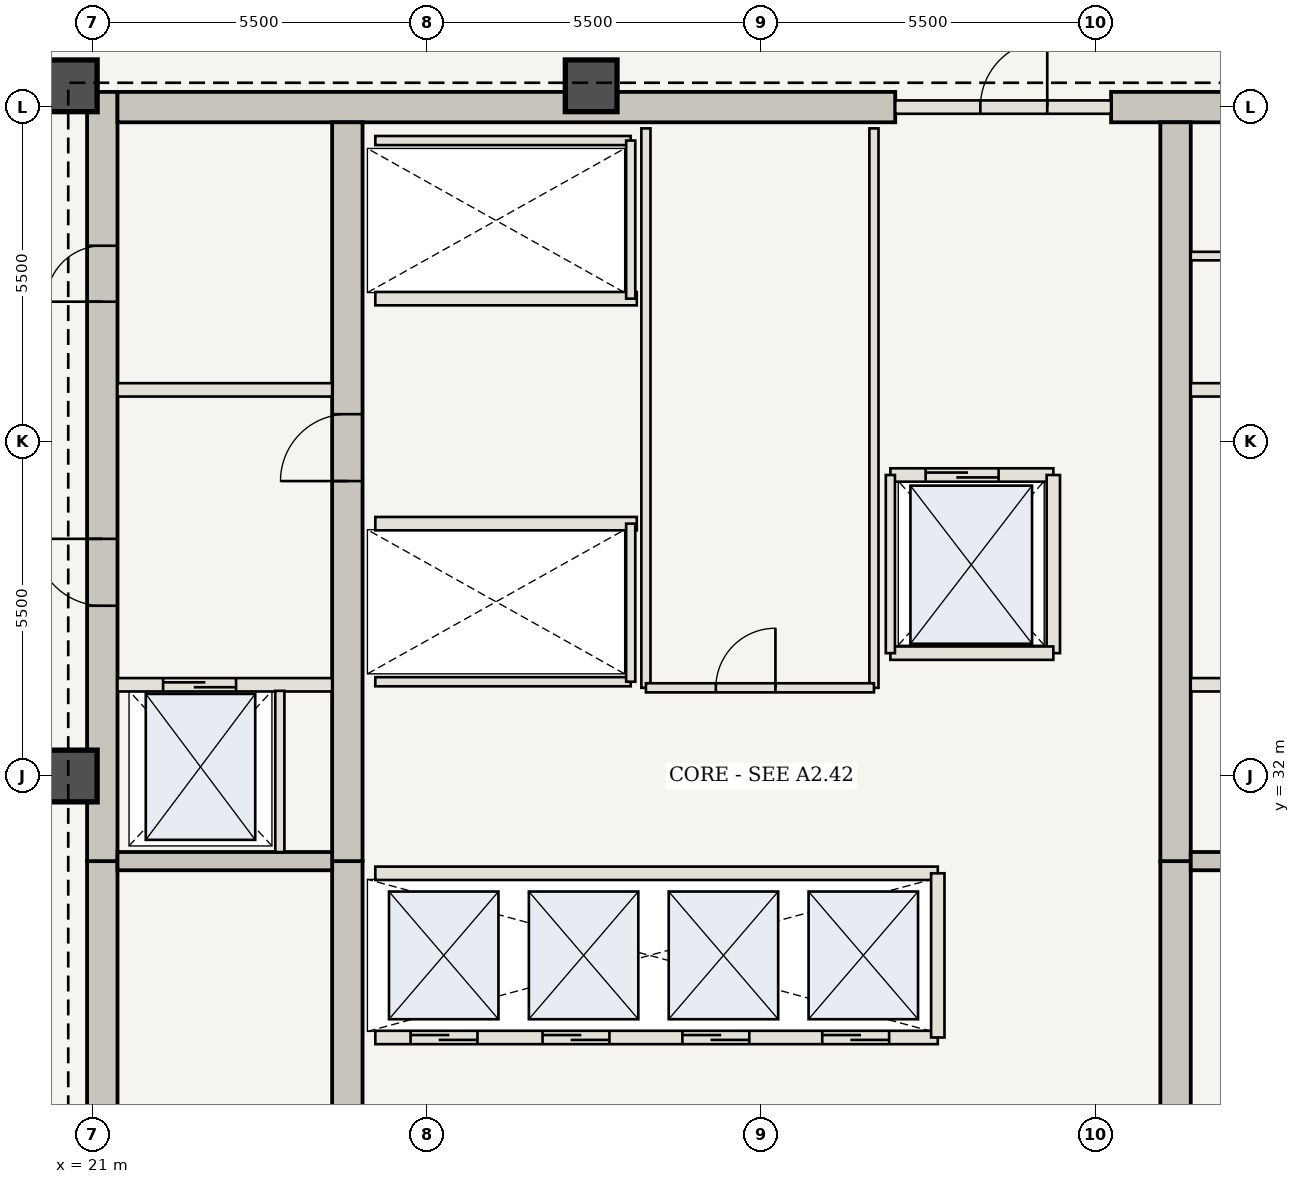
"""IFC4 building model, lengths in metres.
Left out: names, types, materials, properties, quantities, classifications, styles, units other than length and angle.
Written with IfcOpenShell. Run it as: python <this file> out.ifc"""

import sys

from ifc_helpers import new_model, si_unit, direction, frame, frame_2d, origin, origin_2d, place, context, subcontext, project, spatial, rectangle, extrude, element, fill, save


model = new_model("IFC4")
c1 = context("Model", 3, precision=1e-05, world=origin(), true_north=direction((0.0, 1.0)))
c2 = subcontext(c1, "Body", "Model", "MODEL_VIEW")
j1 = project(units=[si_unit("LENGTHUNIT", "METRE"), si_unit("PLANEANGLEUNIT", "RADIAN")], contexts=[c1])
p1 = place(None, origin())
s1 = spatial("IfcSite", under=j1, at=p1, CompositionType="ELEMENT")
p2 = place(p1, origin())
s2 = spatial("IfcBuilding", under=s1, at=p2, CompositionType="ELEMENT")
p3 = place(p2, frame((0.0, 0.0, 186.9)))
s3 = spatial("IfcBuildingStorey", under=s2, at=p3, CompositionType="ELEMENT", Elevation=186.9)
p4 = place(p3, frame((21.16, 20.7, 0.0), z_axis=(0.0, 0.0, 1.0), x_axis=(0.0, 1.0, 0.0)))
e1 = element("IfcWall", 1, at=p4, inside=s3, PredefinedType="SHEAR", context=c2, shape_type="SweptSolid", body=[
    extrude(rectangle(XDim=9.9, YDim=0.5, at=frame_2d((4.95, 0.0))), origin(), (0.0, 0.0, 1.0), 3.85),
])
p5 = place(p4, frame((1.05, 0.0, 0.0)))
e2 = element("IfcOpeningElement", 2, at=p5, cuts=e1, PredefinedType="OPENING", context=c2, shape_type="SweptSolid", body=[
    extrude(rectangle(XDim=1.15, YDim=2.15, at=frame_2d((0.575, 1.075))), frame((0.0, 0.26, 0.0), z_axis=(0.0, -1.0, 0.0), x_axis=(1.0, 0.0, 0.0)), (0.0, 0.0, 1.0), 0.52),
])
p6 = place(p3, frame((21.16, 30.6, 0.0), z_axis=(0.0, 0.0, 1.0), x_axis=(0.0, 1.0, 0.0)))
e3 = element("IfcWall", 3, at=p6, inside=s3, PredefinedType="SHEAR", context=c2, shape_type="SweptSolid", body=[
    extrude(rectangle(XDim=12.65, YDim=0.5, at=frame_2d((6.325, 0.0))), origin(), (0.0, 0.0, 1.0), 3.85),
])
p7 = place(p6, frame((4.2, 0.0, 0.0)))
e4 = element("IfcOpeningElement", 4, at=p7, cuts=e3, PredefinedType="OPENING", context=c2, shape_type="SweptSolid", body=[
    extrude(rectangle(XDim=1.1, YDim=2.15, at=frame_2d((0.55, 1.075))), frame((0.0, 0.26, 0.0), z_axis=(0.0, -1.0, 0.0), x_axis=(1.0, 0.0, 0.0)), (0.0, 0.0, 1.0), 0.52),
])
p8 = place(p6, frame((9.2, 0.0, 0.0)))
e5 = element("IfcOpeningElement", 5, at=p8, cuts=e3, PredefinedType="OPENING", context=c2, shape_type="SweptSolid", body=[
    extrude(rectangle(XDim=0.92, YDim=2.1, at=frame_2d((0.46, 1.05))), frame((0.0, 0.26, 0.0), z_axis=(0.0, -1.0, 0.0), x_axis=(1.0, 0.0, 0.0)), (0.0, 0.0, 1.0), 0.52),
])
p9 = place(p3, frame((21.41, 43.0, 0.0), z_axis=(0.0, 0.0, 1.0), x_axis=(1.0, 0.0, 0.0)))
e6 = element("IfcWall", 6, at=p9, inside=s3, PredefinedType="SHEAR", context=c2, shape_type="SweptSolid", body=[
    extrude(rectangle(XDim=12.79, YDim=0.5, at=frame_2d((6.395, 0.0))), origin(), (0.0, 0.0, 1.0), 3.85),
])
p10 = place(p3, frame((37.75, 43.0, 0.0), z_axis=(0.0, 0.0, 1.0), x_axis=(1.0, 0.0, 0.0)))
e7 = element("IfcWall", 7, at=p10, inside=s3, PredefinedType="SHEAR", context=c2, shape_type="SweptSolid", body=[
    extrude(rectangle(XDim=4.84, YDim=0.5, at=frame_2d((2.42, 0.0))), origin(), (0.0, 0.0, 1.0), 3.85),
])
p11 = place(p3, frame((25.19, 21.2, 0.0), z_axis=(0.0, 0.0, 1.0), x_axis=(0.0, 1.0, 0.0)))
e8 = element("IfcWall", 8, at=p11, inside=s3, PredefinedType="SHEAR", context=c2, shape_type="SweptSolid", body=[
    extrude(rectangle(XDim=9.4, YDim=0.5, at=frame_2d((4.7, 0.0))), origin(), (0.0, 0.0, 1.0), 3.85),
])
p12 = place(p3, frame((25.19, 30.6, 0.0), z_axis=(0.0, 0.0, 1.0), x_axis=(0.0, 1.0, 0.0)))
e9 = element("IfcWall", 9, at=p12, inside=s3, PredefinedType="SHEAR", context=c2, shape_type="SweptSolid", body=[
    extrude(rectangle(XDim=12.15, YDim=0.5, at=frame_2d((6.075, 0.0))), origin(), (0.0, 0.0, 1.0), 3.85),
])
p13 = place(p12, frame((6.25, 0.0, 0.0)))
e10 = element("IfcOpeningElement", 10, at=p13, cuts=e9, PredefinedType="OPENING", context=c2, shape_type="SweptSolid", body=[
    extrude(rectangle(XDim=1.1, YDim=2.15, at=frame_2d((0.55, 1.075))), frame((0.0, 0.26, 0.0), z_axis=(0.0, -1.0, 0.0), x_axis=(1.0, 0.0, 0.0)), (0.0, 0.0, 1.0), 0.52),
])
p14 = place(p3, frame((38.81, 21.2, 0.0), z_axis=(0.0, 0.0, 1.0), x_axis=(0.0, 1.0, 0.0)))
e11 = element("IfcWall", 11, at=p14, inside=s3, PredefinedType="SHEAR", context=c2, shape_type="SweptSolid", body=[
    extrude(rectangle(XDim=9.4, YDim=0.5, at=frame_2d((4.7, 0.0))), origin(), (0.0, 0.0, 1.0), 3.85),
])
p15 = place(p3, frame((38.81, 30.6, 0.0), z_axis=(0.0, 0.0, 1.0), x_axis=(0.0, 1.0, 0.0)))
e12 = element("IfcWall", 12, at=p15, inside=s3, PredefinedType="SHEAR", context=c2, shape_type="SweptSolid", body=[
    extrude(rectangle(XDim=12.15, YDim=0.5, at=frame_2d((6.075, 0.0))), origin(), (0.0, 0.0, 1.0), 3.85),
])
for number, where, z_axis, x_axis in (
    (13, (29.2, 43.35, 0.0), (0.0, 0.0, 1.0), (1.0, 0.0, 0.0)),
    (14, (20.65, 43.35, 0.0), (0.0, 0.0, 1.0), (1.0, 0.0, 0.0)),
    (15, (20.65, 32.0, 0.0), (0.0, 0.0, 1.0), (1.0, 0.0, 0.0)),
):
    element("IfcColumn", number, at=place(p3, frame(where, z_axis=z_axis, x_axis=x_axis)), inside=s3, PredefinedType="COLUMN", context=c2, shape_type="SweptSolid", body=[
        extrude(rectangle(XDim=0.85, YDim=0.85, at=origin_2d()), origin(), (0.0, 0.0, 1.0), 3.85),
    ])
for number, where, z_axis, x_axis in (
    (16, (21.41, 30.6, 0.0), (0.0, 0.0, 1.0), (1.0, 0.0, 0.0)),
    (17, (39.06, 30.6, 0.0), (0.0, 0.0, 1.0), (1.0, 0.0, 0.0)),
):
    element("IfcWall", number, at=place(p3, frame(where, z_axis=z_axis, x_axis=x_axis)), inside=s3, PredefinedType="SHEAR", context=c2, shape_type="SweptSolid", body=[
        extrude(rectangle(XDim=3.53, YDim=0.3, at=frame_2d((1.765, 0.0))), origin(), (0.0, 0.0, 1.0), 3.43),
    ])
p16 = place(p3, frame((21.41, 33.5, 0.0), z_axis=(0.0, 0.0, 1.0), x_axis=(1.0, 0.0, 0.0)))
e18 = element("IfcWall", 18, at=p16, inside=s3, PredefinedType="STANDARD", context=c2, shape_type="SweptSolid", body=[
    extrude(rectangle(XDim=3.53, YDim=0.22, at=frame_2d((1.765, 0.0))), origin(), (0.0, 0.0, 1.0), 3.43),
])
p17 = place(p16, frame((0.75, 0.0, 0.0)))
e19 = element("IfcOpeningElement", 19, at=p17, cuts=e18, PredefinedType="OPENING", context=c2, shape_type="SweptSolid", body=[
    extrude(rectangle(XDim=1.2, YDim=2.2, at=frame_2d((0.6, 1.1))), frame((0.0, 0.12, 0.0), z_axis=(0.0, -1.0, 0.0), x_axis=(1.0, 0.0, 0.0)), (0.0, 0.0, 1.0), 0.24),
])
p18 = place(p3, frame((24.08, 30.75, 0.0), z_axis=(0.0, 0.0, 1.0), x_axis=(0.0, 1.0, 0.0)))
e20 = element("IfcWall", 20, at=p18, inside=s3, PredefinedType="STANDARD", context=c2, shape_type="SweptSolid", body=[
    extrude(rectangle(XDim=2.65, YDim=0.15, at=frame_2d((1.325, 0.0))), origin(), (0.0, 0.0, 1.0), 3.43),
])
p19 = place(p3, frame((39.06, 33.5, 0.0), z_axis=(0.0, 0.0, 1.0), x_axis=(1.0, 0.0, 0.0)))
e21 = element("IfcWall", 21, at=p19, inside=s3, PredefinedType="STANDARD", context=c2, shape_type="SweptSolid", body=[
    extrude(rectangle(XDim=3.53, YDim=0.22, at=frame_2d((1.765, 0.0))), origin(), (0.0, 0.0, 1.0), 3.43),
])
p20 = place(p19, frame((1.55, 0.0, 0.0)))
e22 = element("IfcOpeningElement", 22, at=p20, cuts=e21, PredefinedType="OPENING", context=c2, shape_type="SweptSolid", body=[
    extrude(rectangle(XDim=1.2, YDim=2.2, at=frame_2d((0.6, 1.1))), frame((0.0, 0.12, 0.0), z_axis=(0.0, -1.0, 0.0), x_axis=(1.0, 0.0, 0.0)), (0.0, 0.0, 1.0), 0.24),
])
for number, where, z_axis, x_axis in (
    (23, (21.41, 38.35, 0.0), (0.0, 0.0, 1.0), (1.0, 0.0, 0.0)),
    (24, (39.06, 38.35, 0.0), (0.0, 0.0, 1.0), (1.0, 0.0, 0.0)),
):
    element("IfcWall", number, at=place(p3, frame(where, z_axis=z_axis, x_axis=x_axis)), inside=s3, PredefinedType="STANDARD", context=c2, shape_type="SweptSolid", body=[
        extrude(rectangle(XDim=3.53, YDim=0.22, at=frame_2d((1.765, 0.0))), origin(), (0.0, 0.0, 1.0), 3.43),
    ])
p21 = place(p3, frame((39.06, 40.55, 0.0), z_axis=(0.0, 0.0, 1.0), x_axis=(1.0, 0.0, 0.0)))
e25 = element("IfcWall", 25, at=p21, inside=s3, PredefinedType="STANDARD", context=c2, shape_type="SweptSolid", body=[
    extrude(rectangle(XDim=3.53, YDim=0.14, at=frame_2d((1.765, 0.0))), origin(), (0.0, 0.0, 1.0), 3.43),
])
p22 = place(p3, frame((25.65, 27.7, 0.0), z_axis=(0.0, 0.0, 1.0), x_axis=(1.0, 0.0, 0.0)))
e26 = element("IfcWall", 26, at=p22, inside=s3, PredefinedType="STANDARD", context=c2, shape_type="SweptSolid", body=[
    extrude(rectangle(XDim=9.25, YDim=0.22, at=frame_2d((4.625, 0.0))), origin(), (0.0, 0.0, 1.0), 3.43),
])
p23 = place(p22, frame((0.58, 0.0, 0.0)))
e27 = element("IfcOpeningElement", 27, at=p23, cuts=e26, PredefinedType="OPENING", context=c2, shape_type="SweptSolid", body=[
    extrude(rectangle(XDim=1.1, YDim=2.15, at=frame_2d((0.55, 1.075))), frame((0.0, 0.12, 0.0), z_axis=(0.0, -1.0, 0.0), x_axis=(1.0, 0.0, 0.0)), (0.0, 0.0, 1.0), 0.24),
])
p24 = place(p22, frame((2.75, 0.0, 0.0)))
e28 = element("IfcOpeningElement", 28, at=p24, cuts=e26, PredefinedType="OPENING", context=c2, shape_type="SweptSolid", body=[
    extrude(rectangle(XDim=1.1, YDim=2.15, at=frame_2d((0.55, 1.075))), frame((0.0, 0.12, 0.0), z_axis=(0.0, -1.0, 0.0), x_axis=(1.0, 0.0, 0.0)), (0.0, 0.0, 1.0), 0.24),
])
p25 = place(p22, frame((5.05, 0.0, 0.0)))
e29 = element("IfcOpeningElement", 29, at=p25, cuts=e26, PredefinedType="OPENING", context=c2, shape_type="SweptSolid", body=[
    extrude(rectangle(XDim=1.1, YDim=2.15, at=frame_2d((0.55, 1.075))), frame((0.0, 0.12, 0.0), z_axis=(0.0, -1.0, 0.0), x_axis=(1.0, 0.0, 0.0)), (0.0, 0.0, 1.0), 0.24),
])
p26 = place(p22, frame((7.35, 0.0, 0.0)))
e30 = element("IfcOpeningElement", 30, at=p26, cuts=e26, PredefinedType="OPENING", context=c2, shape_type="SweptSolid", body=[
    extrude(rectangle(XDim=1.1, YDim=2.15, at=frame_2d((0.55, 1.075))), frame((0.0, 0.12, 0.0), z_axis=(0.0, -1.0, 0.0), x_axis=(1.0, 0.0, 0.0)), (0.0, 0.0, 1.0), 0.24),
])
p27 = place(p3, frame((25.65, 30.4, 0.0), z_axis=(0.0, 0.0, 1.0), x_axis=(1.0, 0.0, 0.0)))
e31 = element("IfcWall", 31, at=p27, inside=s3, PredefinedType="STANDARD", context=c2, shape_type="SweptSolid", body=[
    extrude(rectangle(XDim=9.25, YDim=0.22, at=frame_2d((4.625, 0.0))), origin(), (0.0, 0.0, 1.0), 3.43),
])
p28 = place(p3, frame((34.9, 27.7, 0.0), z_axis=(0.0, 0.0, 1.0), x_axis=(0.0, 1.0, 0.0)))
e32 = element("IfcWall", 32, at=p28, inside=s3, PredefinedType="STANDARD", context=c2, shape_type="SweptSolid", body=[
    extrude(rectangle(XDim=2.7, YDim=0.22, at=frame_2d((1.35, 0.0))), origin(), (0.0, 0.0, 1.0), 3.43),
])
p29 = place(p3, frame((25.65, 36.15, 0.0), z_axis=(0.0, 0.0, 1.0), x_axis=(1.0, 0.0, 0.0)))
e33 = element("IfcWall", 33, at=p29, inside=s3, PredefinedType="STANDARD", context=c2, shape_type="SweptSolid", body=[
    extrude(rectangle(XDim=4.3, YDim=0.22, at=frame_2d((2.15, 0.0))), origin(), (0.0, 0.0, 1.0), 3.43),
])
p30 = place(p3, frame((25.65, 33.55, 0.0), z_axis=(0.0, 0.0, 1.0), x_axis=(1.0, 0.0, 0.0)))
e34 = element("IfcWall", 34, at=p30, inside=s3, PredefinedType="STANDARD", context=c2, shape_type="SweptSolid", body=[
    extrude(rectangle(XDim=4.2, YDim=0.15, at=frame_2d((2.1, 0.0))), origin(), (0.0, 0.0, 1.0), 3.43),
])
p31 = place(p3, frame((29.85, 33.55, 0.0), z_axis=(0.0, 0.0, 1.0), x_axis=(0.0, 1.0, 0.0)))
e35 = element("IfcWall", 35, at=p31, inside=s3, PredefinedType="STANDARD", context=c2, shape_type="SweptSolid", body=[
    extrude(rectangle(XDim=2.6, YDim=0.15, at=frame_2d((1.3, 0.0))), origin(), (0.0, 0.0, 1.0), 3.43),
])
p32 = place(p3, frame((25.65, 39.85, 0.0), z_axis=(0.0, 0.0, 1.0), x_axis=(1.0, 0.0, 0.0)))
e36 = element("IfcWall", 36, at=p32, inside=s3, PredefinedType="STANDARD", context=c2, shape_type="SweptSolid", body=[
    extrude(rectangle(XDim=4.3, YDim=0.22, at=frame_2d((2.15, 0.0))), origin(), (0.0, 0.0, 1.0), 3.43),
])
p33 = place(p3, frame((25.65, 42.45, 0.0), z_axis=(0.0, 0.0, 1.0), x_axis=(1.0, 0.0, 0.0)))
e37 = element("IfcWall", 37, at=p33, inside=s3, PredefinedType="STANDARD", context=c2, shape_type="SweptSolid", body=[
    extrude(rectangle(XDim=4.2, YDim=0.15, at=frame_2d((2.1, 0.0))), origin(), (0.0, 0.0, 1.0), 3.43),
])
p34 = place(p3, frame((29.85, 39.85, 0.0), z_axis=(0.0, 0.0, 1.0), x_axis=(0.0, 1.0, 0.0)))
e38 = element("IfcWall", 38, at=p34, inside=s3, PredefinedType="STANDARD", context=c2, shape_type="SweptSolid", body=[
    extrude(rectangle(XDim=2.6, YDim=0.15, at=frame_2d((1.3, 0.0))), origin(), (0.0, 0.0, 1.0), 3.43),
])
for number, where, z_axis, x_axis in (
    (39, (30.1, 33.45, 0.0), (0.0, 0.0, 1.0), (0.0, 1.0, 0.0)),
    (40, (33.85, 33.45, 0.0), (0.0, 0.0, 1.0), (0.0, 1.0, 0.0)),
):
    element("IfcWall", number, at=place(p3, frame(where, z_axis=z_axis, x_axis=x_axis)), inside=s3, PredefinedType="STANDARD", context=c2, shape_type="SweptSolid", body=[
        extrude(rectangle(XDim=9.2, YDim=0.15, at=frame_2d((4.6, 0.0))), origin(), (0.0, 0.0, 1.0), 3.43),
    ])
p35 = place(p3, frame((30.1, 33.45, 0.0), z_axis=(0.0, 0.0, 1.0), x_axis=(1.0, 0.0, 0.0)))
e41 = element("IfcWall", 41, at=p35, inside=s3, PredefinedType="STANDARD", context=c2, shape_type="SweptSolid", body=[
    extrude(rectangle(XDim=3.75, YDim=0.15, at=frame_2d((1.875, 0.0))), origin(), (0.0, 0.0, 1.0), 3.43),
])
p36 = place(p35, frame((1.15, 0.0, 0.0)))
e42 = element("IfcOpeningElement", 42, at=p36, cuts=e41, PredefinedType="OPENING", context=c2, shape_type="SweptSolid", body=[
    extrude(rectangle(XDim=0.98, YDim=2.2, at=frame_2d((0.49, 1.1))), frame((0.0, 0.085, 0.0), z_axis=(0.0, -1.0, 0.0), x_axis=(1.0, 0.0, 0.0)), (0.0, 0.0, 1.0), 0.17),
])
p37 = place(p3, frame((34.2, 43.0, 0.0), z_axis=(0.0, 0.0, 1.0), x_axis=(1.0, 0.0, 0.0)))
e43 = element("IfcWall", 43, at=p37, inside=s3, PredefinedType="STANDARD", context=c2, shape_type="SweptSolid", body=[
    extrude(rectangle(XDim=3.55, YDim=0.22, at=frame_2d((1.775, 0.0))), origin(), (0.0, 0.0, 1.0), 3.43),
])
p38 = place(p37, frame((1.4, 0.0, 0.0)))
e44 = element("IfcOpeningElement", 44, at=p38, cuts=e43, PredefinedType="OPENING", context=c2, shape_type="SweptSolid", body=[
    extrude(rectangle(XDim=1.1, YDim=2.15, at=frame_2d((0.55, 1.075))), frame((0.0, 0.12, 0.0), z_axis=(0.0, -1.0, 0.0), x_axis=(1.0, 0.0, 0.0)), (0.0, 0.0, 1.0), 0.24),
])
p39 = place(p3, frame((34.12, 36.95, 0.0), z_axis=(0.0, 0.0, 1.0), x_axis=(1.0, 0.0, 0.0)))
e45 = element("IfcWall", 45, at=p39, inside=s3, PredefinedType="STANDARD", context=c2, shape_type="SweptSolid", body=[
    extrude(rectangle(XDim=2.68, YDim=0.22, at=frame_2d((1.34, 0.0))), origin(), (0.0, 0.0, 1.0), 3.43),
])
p40 = place(p39, frame((0.58, 0.0, 0.0)))
e46 = element("IfcOpeningElement", 46, at=p40, cuts=e45, PredefinedType="OPENING", context=c2, shape_type="SweptSolid", body=[
    extrude(rectangle(XDim=1.2, YDim=2.2, at=frame_2d((0.6, 1.1))), frame((0.0, 0.12, 0.0), z_axis=(0.0, -1.0, 0.0), x_axis=(1.0, 0.0, 0.0)), (0.0, 0.0, 1.0), 0.24),
])
p41 = place(p3, frame((36.8, 34.02, 0.0), z_axis=(0.0, 0.0, 1.0), x_axis=(0.0, 1.0, 0.0)))
e47 = element("IfcWall", 47, at=p41, inside=s3, PredefinedType="STANDARD", context=c2, shape_type="SweptSolid", body=[
    extrude(rectangle(XDim=2.93, YDim=0.22, at=frame_2d((1.465, 0.0))), origin(), (0.0, 0.0, 1.0), 3.43),
])
p42 = place(p3, frame((34.12, 34.02, 0.0), z_axis=(0.0, 0.0, 1.0), x_axis=(1.0, 0.0, 0.0)))
e48 = element("IfcWall", 48, at=p42, inside=s3, PredefinedType="STANDARD", context=c2, shape_type="SweptSolid", body=[
    extrude(rectangle(XDim=2.68, YDim=0.22, at=frame_2d((1.34, 0.0))), origin(), (0.0, 0.0, 1.0), 3.43),
])
p43 = place(p3, frame((34.12, 34.02, 0.0), z_axis=(0.0, 0.0, 1.0), x_axis=(0.0, 1.0, 0.0)))
e49 = element("IfcWall", 49, at=p43, inside=s3, PredefinedType="STANDARD", context=c2, shape_type="SweptSolid", body=[
    extrude(rectangle(XDim=2.93, YDim=0.15, at=frame_2d((1.465, 0.0))), origin(), (0.0, 0.0, 1.0), 3.43),
])
p44 = place(p7, origin())
e50 = element("IfcDoor", 50, at=p44, inside=s3, OperationType="SINGLE_SWING_RIGHT", PredefinedType="DOOR", context=c2, shape_type="SweptSolid", body=[
    extrude(rectangle(XDim=1.1, YDim=2.15, at=frame_2d((0.55, 1.075))), frame((0.0, 0.025, 0.0), z_axis=(0.0, -1.0, 0.0), x_axis=(1.0, 0.0, 0.0)), (0.0, 0.0, 1.0), 0.05),
])
fill(e4, e50)
p45 = place(p13, origin())
e51 = element("IfcDoor", 51, at=p45, inside=s3, OperationType="SINGLE_SWING_LEFT", PredefinedType="DOOR", context=c2, shape_type="SweptSolid", body=[
    extrude(rectangle(XDim=1.1, YDim=2.15, at=frame_2d((0.55, 1.075))), frame((0.0, 0.025, 0.0), z_axis=(0.0, -1.0, 0.0), x_axis=(1.0, 0.0, 0.0)), (0.0, 0.0, 1.0), 0.05),
])
fill(e10, e51)
p46 = place(p8, origin())
e52 = element("IfcDoor", 52, at=p46, inside=s3, OperationType="SINGLE_SWING_LEFT", PredefinedType="DOOR", context=c2, shape_type="SweptSolid", body=[
    extrude(rectangle(XDim=0.92, YDim=2.1, at=frame_2d((0.46, 1.05))), frame((0.0, 0.025, 0.0), z_axis=(0.0, -1.0, 0.0), x_axis=(1.0, 0.0, 0.0)), (0.0, 0.0, 1.0), 0.05),
])
fill(e5, e52)
p47 = place(p17, origin())
e53 = element("IfcDoor", 53, at=p47, inside=s3, OperationType="DOUBLE_DOOR_SLIDING", PredefinedType="DOOR", context=c2, shape_type="SweptSolid", body=[
    extrude(rectangle(XDim=1.2, YDim=2.2, at=frame_2d((0.6, 1.1))), frame((0.0, 0.025, 0.0), z_axis=(0.0, -1.0, 0.0), x_axis=(1.0, 0.0, 0.0)), (0.0, 0.0, 1.0), 0.05),
])
fill(e19, e53)
p48 = place(p23, origin())
e54 = element("IfcDoor", 54, at=p48, inside=s3, OperationType="DOUBLE_DOOR_SLIDING", PredefinedType="DOOR", context=c2, shape_type="SweptSolid", body=[
    extrude(rectangle(XDim=1.1, YDim=2.15, at=frame_2d((0.55, 1.075))), frame((0.0, 0.025, 0.0), z_axis=(0.0, -1.0, 0.0), x_axis=(1.0, 0.0, 0.0)), (0.0, 0.0, 1.0), 0.05),
])
fill(e27, e54)
p49 = place(p24, origin())
e55 = element("IfcDoor", 55, at=p49, inside=s3, OperationType="DOUBLE_DOOR_SLIDING", PredefinedType="DOOR", context=c2, shape_type="SweptSolid", body=[
    extrude(rectangle(XDim=1.1, YDim=2.15, at=frame_2d((0.55, 1.075))), frame((0.0, 0.025, 0.0), z_axis=(0.0, -1.0, 0.0), x_axis=(1.0, 0.0, 0.0)), (0.0, 0.0, 1.0), 0.05),
])
fill(e28, e55)
p50 = place(p25, origin())
e56 = element("IfcDoor", 56, at=p50, inside=s3, OperationType="DOUBLE_DOOR_SLIDING", PredefinedType="DOOR", context=c2, shape_type="SweptSolid", body=[
    extrude(rectangle(XDim=1.1, YDim=2.15, at=frame_2d((0.55, 1.075))), frame((0.0, 0.025, 0.0), z_axis=(0.0, -1.0, 0.0), x_axis=(1.0, 0.0, 0.0)), (0.0, 0.0, 1.0), 0.05),
])
fill(e29, e56)
p51 = place(p26, origin())
e57 = element("IfcDoor", 57, at=p51, inside=s3, OperationType="DOUBLE_DOOR_SLIDING", PredefinedType="DOOR", context=c2, shape_type="SweptSolid", body=[
    extrude(rectangle(XDim=1.1, YDim=2.15, at=frame_2d((0.55, 1.075))), frame((0.0, 0.025, 0.0), z_axis=(0.0, -1.0, 0.0), x_axis=(1.0, 0.0, 0.0)), (0.0, 0.0, 1.0), 0.05),
])
fill(e30, e57)
p52 = place(p36, origin())
e58 = element("IfcDoor", 58, at=p52, inside=s3, OperationType="SINGLE_SWING_RIGHT", PredefinedType="DOOR", context=c2, shape_type="SweptSolid", body=[
    extrude(rectangle(XDim=0.98, YDim=2.2, at=frame_2d((0.49, 1.1))), frame((0.0, 0.025, 0.0), z_axis=(0.0, -1.0, 0.0), x_axis=(1.0, 0.0, 0.0)), (0.0, 0.0, 1.0), 0.05),
])
fill(e42, e58)
p53 = place(p38, origin())
e59 = element("IfcDoor", 59, at=p53, inside=s3, OperationType="SINGLE_SWING_RIGHT", PredefinedType="DOOR", context=c2, shape_type="SweptSolid", body=[
    extrude(rectangle(XDim=1.1, YDim=2.15, at=frame_2d((0.55, 1.075))), frame((0.0, 0.025, 0.0), z_axis=(0.0, -1.0, 0.0), x_axis=(1.0, 0.0, 0.0)), (0.0, 0.0, 1.0), 0.05),
])
fill(e44, e59)
p54 = place(p40, origin())
e60 = element("IfcDoor", 60, at=p54, inside=s3, OperationType="DOUBLE_DOOR_SLIDING", PredefinedType="DOOR", context=c2, shape_type="SweptSolid", body=[
    extrude(rectangle(XDim=1.2, YDim=2.2, at=frame_2d((0.6, 1.1))), frame((0.0, 0.025, 0.0), z_axis=(0.0, -1.0, 0.0), x_axis=(1.0, 0.0, 0.0)), (0.0, 0.0, 1.0), 0.05),
])
fill(e46, e60)
save(model, sys.argv[1])
